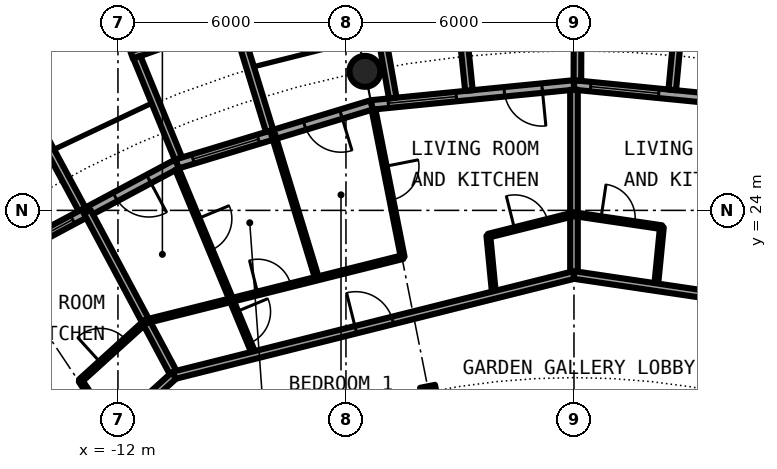
"""IFC4 building model, lengths in metres.
Left out: names, types, materials, properties, quantities, classifications, styles, units other than length and angle.
Written with IfcOpenShell. Run it as: python <this file> out.ifc"""

import sys

from ifc_helpers import new_model, si_unit, direction, frame, frame_2d, origin, origin_2d, place, context, subcontext, project, spatial, rectangle, circle, hollow_circle, i_section, extrude, element, fill, save


model = new_model("IFC4")
c1 = context("Model", 3, precision=1e-05, world=origin(), true_north=direction((0.0, 1.0)))
c2 = subcontext(c1, "Body", "Model", "MODEL_VIEW")
j1 = project(units=[si_unit("LENGTHUNIT", "METRE"), si_unit("PLANEANGLEUNIT", "RADIAN")], contexts=[c1])
p1 = place(None, origin())
s1 = spatial("IfcSite", under=j1, at=p1, CompositionType="ELEMENT")
p2 = place(p1, origin())
s2 = spatial("IfcBuilding", under=s1, at=p2, CompositionType="ELEMENT")
p3 = place(p2, frame((0.0, 0.0, 212.7)))
s3 = spatial("IfcBuildingStorey", under=s2, at=p3, CompositionType="ELEMENT", Elevation=212.7)
p4 = place(p3, frame((-5.501, 27.658, 0.0), z_axis=(0.0, 0.0, 1.0), x_axis=(1.0, 0.0, 0.0)))
e1 = element("IfcColumn", 1, at=p4, inside=s3, PredefinedType="COLUMN", context=c2, shape_type="SweptSolid", body=[
    extrude(hollow_circle(Radius=0.406, WallThickness=0.03, at=origin_2d()), origin(), (0.0, 0.0, 1.0), 3.05),
])
p5 = place(p3, frame((-3.824, 19.223, 0.0), z_axis=(0.0, 0.0, 1.0), x_axis=(-0.195090322016, 0.980785280403, 0.0)))
e2 = element("IfcColumn", 2, at=p5, inside=s3, PredefinedType="COLUMN", context=c2, shape_type="SweptSolid", body=[
    extrude(i_section(OverallWidth=0.3, OverallDepth=0.4, WebThickness=0.013, FlangeThickness=0.024, FilletRadius=0.027, at=origin_2d()), origin(), (0.0, 0.0, 1.0), 3.05),
])
p6 = place(p3, frame((5.326, 26.775, 0.0), z_axis=(0.0, 0.0, 1.0), x_axis=(-0.995173996315, 0.098126026407, 0.0)))
e3 = element("IfcWall", 3, at=p6, inside=s3, PredefinedType="SOLIDWALL", context=c2, shape_type="SweptSolid", body=[
    extrude(rectangle(XDim=5.352, YDim=0.25, at=frame_2d((2.676, 0.0))), origin(), (0.0, 0.0, 1.0), 2.7),
])
p7 = place(p6, frame((0.841, 0.0, 0.0)))
e4 = element("IfcOpeningElement", 4, at=p7, cuts=e3, PredefinedType="OPENING", context=c2, shape_type="SweptSolid", body=[
    extrude(rectangle(XDim=1.0, YDim=2.2, at=frame_2d((0.5, 1.1))), frame((0.0, 0.135, 0.0), z_axis=(0.0, -1.0, 0.0), x_axis=(1.0, 0.0, 0.0)), (0.0, 0.0, 1.0), 0.27),
])
p8 = place(p6, frame((3.111, 0.0, 0.3)))
e5 = element("IfcOpeningElement", 5, at=p8, cuts=e3, PredefinedType="OPENING", context=c2, shape_type="SweptSolid", body=[
    extrude(rectangle(XDim=1.8, YDim=2.1, at=frame_2d((0.9, 1.05))), frame((0.0, 0.135, 0.0), z_axis=(0.0, -1.0, 0.0), x_axis=(1.0, 0.0, 0.0)), (0.0, 0.0, 1.0), 0.27),
])
p9 = place(p3, frame((2.586, 27.171, -0.03), z_axis=(0.0, 0.0, 1.0), x_axis=(0.094548432284, 0.995520262954, 0.0)))
e6 = element("IfcWall", 6, at=p9, inside=s3, PredefinedType="SOLIDWALL", context=c2, shape_type="SweptSolid", body=[
    extrude(rectangle(XDim=3.006, YDim=0.2, at=frame_2d((1.503, 0.0))), origin(), (0.0, 0.0, 1.0), 2.73),
])
p10 = place(p3, frame((0.09, 27.417, -0.03), z_axis=(0.0, 0.0, 1.0), x_axis=(0.00347308367, 0.999993968827, 0.0)))
e7 = element("IfcWall", 7, at=p10, inside=s3, PredefinedType="SOLIDWALL", context=c2, shape_type="SweptSolid", body=[
    extrude(rectangle(XDim=2.882, YDim=0.2, at=frame_2d((1.441, 0.0))), origin(), (0.0, 0.0, 1.0), 2.73),
])
p11 = place(p3, frame((0.0, 27.3, 0.0), z_axis=(0.0, 0.0, 1.0), x_axis=(-0.995173996315, -0.098126026407, 0.0)))
e8 = element("IfcWall", 8, at=p11, inside=s3, PredefinedType="SOLIDWALL", context=c2, shape_type="SweptSolid", body=[
    extrude(rectangle(XDim=5.352, YDim=0.25, at=frame_2d((2.676, 0.0))), origin(), (0.0, 0.0, 1.0), 2.7),
])
p12 = place(p11, frame((0.841, 0.0, 0.0)))
e9 = element("IfcOpeningElement", 9, at=p12, cuts=e8, PredefinedType="OPENING", context=c2, shape_type="SweptSolid", body=[
    extrude(rectangle(XDim=1.0, YDim=2.2, at=frame_2d((0.5, 1.1))), frame((0.0, 0.135, 0.0), z_axis=(0.0, -1.0, 0.0), x_axis=(1.0, 0.0, 0.0)), (0.0, 0.0, 1.0), 0.27),
])
p13 = place(p11, frame((3.111, 0.0, 0.3)))
e10 = element("IfcOpeningElement", 10, at=p13, cuts=e8, PredefinedType="OPENING", context=c2, shape_type="SweptSolid", body=[
    extrude(rectangle(XDim=1.8, YDim=2.1, at=frame_2d((0.9, 1.05))), frame((0.0, 0.135, 0.0), z_axis=(0.0, -1.0, 0.0), x_axis=(1.0, 0.0, 0.0)), (0.0, 0.0, 1.0), 0.27),
])
p14 = place(p3, frame((-2.764, 27.153, -0.03), z_axis=(0.0, 0.0, 1.0), x_axis=(-0.101505487237, 0.994834979311, 0.0)))
e11 = element("IfcWall", 11, at=p14, inside=s3, PredefinedType="SOLIDWALL", context=c2, shape_type="SweptSolid", body=[
    extrude(rectangle(XDim=3.007, YDim=0.2, at=frame_2d((1.503, 0.0))), origin(), (0.0, 0.0, 1.0), 2.73),
])
p15 = place(p3, frame((-4.769, 26.956, -0.03), z_axis=(0.0, 0.0, 1.0), x_axis=(-0.174056778901, 0.984735618183, 0.0)))
e12 = element("IfcWall", 12, at=p15, inside=s3, PredefinedType="SOLIDWALL", context=c2, shape_type="SweptSolid", body=[
    extrude(rectangle(XDim=2.925, YDim=0.2, at=frame_2d((1.462, 0.0))), origin(), (0.0, 0.0, 1.0), 2.73),
])
p16 = place(p3, frame((-5.326, 26.775, 0.0), z_axis=(0.0, 0.0, 1.0), x_axis=(-0.956965678721, -0.290201119486, 0.0)))
e13 = element("IfcWall", 13, at=p16, inside=s3, PredefinedType="SOLIDWALL", context=c2, shape_type="SweptSolid", body=[
    extrude(rectangle(XDim=5.351, YDim=0.25, at=frame_2d((2.676, 0.0))), origin(), (0.0, 0.0, 1.0), 2.7),
])
p17 = place(p16, frame((0.841, 0.0, 0.0)))
e14 = element("IfcOpeningElement", 14, at=p17, cuts=e13, PredefinedType="OPENING", context=c2, shape_type="SweptSolid", body=[
    extrude(rectangle(XDim=1.0, YDim=2.2, at=frame_2d((0.5, 1.1))), frame((0.0, 0.135, 0.0), z_axis=(0.0, -1.0, 0.0), x_axis=(1.0, 0.0, 0.0)), (0.0, 0.0, 1.0), 0.27),
])
p18 = place(p16, frame((3.111, 0.0, 0.3)))
e15 = element("IfcOpeningElement", 15, at=p18, cuts=e13, PredefinedType="OPENING", context=c2, shape_type="SweptSolid", body=[
    extrude(rectangle(XDim=1.8, YDim=2.1, at=frame_2d((0.9, 1.05))), frame((0.0, 0.135, 0.0), z_axis=(0.0, -1.0, 0.0), x_axis=(1.0, 0.0, 0.0)), (0.0, 0.0, 1.0), 0.27),
])
p19 = place(p3, frame((-8.82, 29.093, -0.03), z_axis=(0.0, 0.0, 1.0), x_axis=(-0.941461077774, -0.337121697664, 0.0)))
e16 = element("IfcWall", 16, at=p19, inside=s3, PredefinedType="SOLIDWALL", context=c2, shape_type="SweptSolid", body=[
    extrude(rectangle(XDim=2.993, YDim=0.2, at=frame_2d((1.497, 0.0))), origin(), (0.0, 0.0, 1.0), 2.73),
])
p20 = place(p19, frame((0.457, 0.0, 0.33)))
e17 = element("IfcOpeningElement", 17, at=p20, cuts=e16, PredefinedType="OPENING", context=c2, shape_type="SweptSolid", body=[
    extrude(circle(Radius=1.04, at=frame_2d((1.04, 1.04))), frame((0.0, 0.11, 0.0), z_axis=(0.0, -1.0, 0.0), x_axis=(1.0, 0.0, 0.0)), (0.0, 0.0, 1.0), 0.22),
])
p21 = place(p3, frame((-8.009, 26.092, -0.03), z_axis=(0.0, 0.0, 1.0), x_axis=(-0.293406695073, 0.955987715029, 0.0)))
e18 = element("IfcWall", 18, at=p21, inside=s3, PredefinedType="SOLIDWALL", context=c2, shape_type="SweptSolid", body=[
    extrude(rectangle(XDim=3.006, YDim=0.2, at=frame_2d((1.503, 0.0))), origin(), (0.0, 0.0, 1.0), 2.73),
])
p22 = place(p3, frame((-10.409, 25.364, -0.03), z_axis=(0.0, 0.0, 1.0), x_axis=(-0.379509886562, 0.925187681501, 0.0)))
e19 = element("IfcWall", 19, at=p22, inside=s3, PredefinedType="SOLIDWALL", context=c2, shape_type="SweptSolid", body=[
    extrude(rectangle(XDim=2.883, YDim=0.2, at=frame_2d((1.441, 0.0))), origin(), (0.0, 0.0, 1.0), 2.73),
])
p23 = place(p3, frame((-10.447, 25.222, 0.0), z_axis=(0.0, 0.0, 1.0), x_axis=(-0.881915646801, -0.471407246368, 0.0)))
e20 = element("IfcWall", 20, at=p23, inside=s3, PredefinedType="SOLIDWALL", context=c2, shape_type="SweptSolid", body=[
    extrude(rectangle(XDim=5.352, YDim=0.25, at=frame_2d((2.676, 0.0))), origin(), (0.0, 0.0, 1.0), 2.7),
])
p24 = place(p23, frame((0.841, 0.0, 0.0)))
e21 = element("IfcOpeningElement", 21, at=p24, cuts=e20, PredefinedType="OPENING", context=c2, shape_type="SweptSolid", body=[
    extrude(rectangle(XDim=1.0, YDim=2.2, at=frame_2d((0.5, 1.1))), frame((0.0, 0.135, 0.0), z_axis=(0.0, -1.0, 0.0), x_axis=(1.0, 0.0, 0.0)), (0.0, 0.0, 1.0), 0.27),
])
p25 = place(p23, frame((3.111, 0.0, 0.3)))
e22 = element("IfcOpeningElement", 22, at=p25, cuts=e20, PredefinedType="OPENING", context=c2, shape_type="SweptSolid", body=[
    extrude(rectangle(XDim=1.8, YDim=2.1, at=frame_2d((0.9, 1.05))), frame((0.0, 0.135, 0.0), z_axis=(0.0, -1.0, 0.0), x_axis=(1.0, 0.0, 0.0)), (0.0, 0.0, 1.0), 0.27),
])
p26 = place(p3, frame((-12.945, 24.029, -0.03), z_axis=(0.0, 0.0, 1.0), x_axis=(-0.474424310775, 0.88029629861, 0.0)))
e23 = element("IfcWall", 23, at=p26, inside=s3, PredefinedType="SOLIDWALL", context=c2, shape_type="SweptSolid", body=[
    extrude(rectangle(XDim=3.006, YDim=0.2, at=frame_2d((1.503, 0.0))), origin(), (0.0, 0.0, 1.0), 2.73),
])
p27 = place(p3, frame((-10.446, 25.086, 0.0), z_axis=(0.0, 0.0, 1.0), x_axis=(0.38420646001, -0.923247202046, 0.0)))
e24 = element("IfcWall", 24, at=p27, inside=s3, PredefinedType="PARTITIONING", context=c2, shape_type="SweptSolid", body=[
    extrude(rectangle(XDim=5.3, YDim=0.1, at=frame_2d((2.65, 0.0))), origin(), (0.0, 0.0, 1.0), 2.7),
])
p28 = place(p27, frame((4.065, 0.0, 0.0)))
e25 = element("IfcOpeningElement", 25, at=p28, cuts=e24, PredefinedType="OPENING", context=c2, shape_type="SweptSolid", body=[
    extrude(rectangle(XDim=0.9, YDim=2.3, at=frame_2d((0.45, 1.15))), frame((0.0, 0.06, 0.0), z_axis=(0.0, -1.0, 0.0), x_axis=(1.0, 0.0, 0.0)), (0.0, 0.0, 1.0), 0.12),
])
p29 = place(p27, frame((1.415, 0.0, 0.0)))
e26 = element("IfcOpeningElement", 26, at=p29, cuts=e24, PredefinedType="OPENING", context=c2, shape_type="SweptSolid", body=[
    extrude(rectangle(XDim=0.9, YDim=2.3, at=frame_2d((0.45, 1.15))), frame((0.0, 0.06, 0.0), z_axis=(0.0, -1.0, 0.0), x_axis=(1.0, 0.0, 0.0)), (0.0, 0.0, 1.0), 0.12),
])
p30 = place(p3, frame((-12.988, 19.518, 0.0), z_axis=(0.0, 0.0, 1.0), x_axis=(0.554125989098, -0.832432813028, 0.0)))
e27 = element("IfcWall", 27, at=p30, inside=s3, PredefinedType="PARTITIONING", context=c2, shape_type="SweptSolid", body=[
    extrude(rectangle(XDim=1.57, YDim=0.1, at=frame_2d((0.785, 0.0))), origin(), (0.0, 0.0, 1.0), 2.7),
])
p31 = place(p3, frame((-12.809, 23.966, 0.0), z_axis=(0.0, 0.0, 1.0), x_axis=(0.471271812246, -0.881988026553, 0.0)))
e28 = element("IfcWall", 28, at=p31, inside=s3, PredefinedType="PARTITIONING", context=c2, shape_type="SweptSolid", body=[
    extrude(rectangle(XDim=4.874, YDim=0.2, at=frame_2d((2.437, 0.0))), origin(), (0.0, 0.0, 1.0), 2.7),
])
p32 = place(p3, frame((-7.914, 25.997, 0.0), z_axis=(0.0, 0.0, 1.0), x_axis=(0.291291575636, -0.956634317785, 0.0)))
e29 = element("IfcWall", 29, at=p32, inside=s3, PredefinedType="PARTITIONING", context=c2, shape_type="SweptSolid", body=[
    extrude(rectangle(XDim=3.962, YDim=0.1, at=frame_2d((1.981, 0.0))), origin(), (0.0, 0.0, 1.0), 2.7),
])
p33 = place(p3, frame((-5.276, 26.658, 0.0), z_axis=(0.0, 0.0, 1.0), x_axis=(0.194030211642, -0.980995554001, 0.0)))
e30 = element("IfcWall", 30, at=p33, inside=s3, PredefinedType="PARTITIONING", context=c2, shape_type="SweptSolid", body=[
    extrude(rectangle(XDim=3.962, YDim=0.1, at=frame_2d((1.981, 0.0))), origin(), (0.0, 0.0, 1.0), 2.7),
])
p34 = place(p33, frame((1.531, 0.0, 0.0)))
e31 = element("IfcOpeningElement", 31, at=p34, cuts=e30, PredefinedType="OPENING", context=c2, shape_type="SweptSolid", body=[
    extrude(rectangle(XDim=0.9, YDim=2.3, at=frame_2d((0.45, 1.15))), frame((0.0, 0.06, 0.0), z_axis=(0.0, -1.0, 0.0), x_axis=(1.0, 0.0, 0.0)), (0.0, 0.0, 1.0), 0.12),
])
p35 = place(p3, frame((-2.253, 23.336, 0.0), z_axis=(0.0, 0.0, 1.0), x_axis=(0.09608568494, -0.995373066317, 0.0)))
e32 = element("IfcWall", 32, at=p35, inside=s3, PredefinedType="PARTITIONING", context=c2, shape_type="SweptSolid", body=[
    extrude(rectangle(XDim=1.57, YDim=0.1, at=frame_2d((0.785, 0.0))), origin(), (0.0, 0.0, 1.0), 2.7),
])
p36 = place(p3, frame((0.0, 22.3, 0.0), z_axis=(0.0, 0.0, 1.0), x_axis=(0.0, 1.0, 0.0)))
e33 = element("IfcWall", 33, at=p36, inside=s3, PredefinedType="PARTITIONING", context=c2, shape_type="SweptSolid", body=[
    extrude(rectangle(XDim=4.875, YDim=0.2, at=frame_2d((2.438, 0.0))), origin(), (0.0, 0.0, 1.0), 2.7),
])
p37 = place(p3, frame((2.158, 21.98, 0.0), z_axis=(0.0, 0.0, 1.0), x_axis=(0.097840737576, 0.995202085041, 0.0)))
e34 = element("IfcWall", 34, at=p37, inside=s3, PredefinedType="PARTITIONING", context=c2, shape_type="SweptSolid", body=[
    extrude(rectangle(XDim=1.584, YDim=0.1, at=frame_2d((0.792, 0.0))), origin(), (0.0, 0.0, 1.0), 2.7),
])
p38 = place(p3, frame((-18.543, 12.386, 0.0), z_axis=(0.0, 0.0, 1.0), x_axis=(0.740853508928, 0.671666642248, 0.0)))
e35 = element("IfcWall", 35, at=p38, inside=s3, PredefinedType="PARTITIONING", context=c2, shape_type="SweptSolid", body=[
    extrude(rectangle(XDim=10.84, YDim=0.2, at=frame_2d((5.42, 0.0))), origin(), (0.0, 0.0, 1.0), 2.7),
])
p39 = place(p38, frame((4.921, 0.0, 0.0)))
e36 = element("IfcOpeningElement", 36, at=p39, cuts=e35, PredefinedType="OPENING", context=c2, shape_type="SweptSolid", body=[
    extrude(rectangle(XDim=1.0, YDim=2.3, at=frame_2d((0.5, 1.15))), frame((0.0, 0.11, 0.0), z_axis=(0.0, -1.0, 0.0), x_axis=(1.0, 0.0, 0.0)), (0.0, 0.0, 1.0), 0.22),
])
p40 = place(p3, frame((-10.521, 19.662, 0.0), z_axis=(0.0, 0.0, 1.0), x_axis=(0.969975443945, 0.243202874456, 0.0)))
e37 = element("IfcWall", 37, at=p40, inside=s3, PredefinedType="PARTITIONING", context=c2, shape_type="SweptSolid", body=[
    extrude(rectangle(XDim=10.847, YDim=0.2, at=frame_2d((5.423, 0.0))), origin(), (0.0, 0.0, 1.0), 2.7),
])
p41 = place(p40, frame((4.928, 0.0, 0.0)))
e38 = element("IfcOpeningElement", 38, at=p41, cuts=e37, PredefinedType="OPENING", context=c2, shape_type="SweptSolid", body=[
    extrude(rectangle(XDim=1.0, YDim=2.3, at=frame_2d((0.5, 1.15))), frame((0.0, 0.11, 0.0), z_axis=(0.0, -1.0, 0.0), x_axis=(1.0, 0.0, 0.0)), (0.0, 0.0, 1.0), 0.22),
])
p42 = place(p3, frame((0.0, 22.3, 0.0), z_axis=(0.0, 0.0, 1.0), x_axis=(0.989181015112, -0.146700100005, 0.0)))
e39 = element("IfcWall", 39, at=p42, inside=s3, PredefinedType="PARTITIONING", context=c2, shape_type="SweptSolid", body=[
    extrude(rectangle(XDim=6.544, YDim=0.2, at=frame_2d((3.272, 0.0))), origin(), (0.0, 0.0, 1.0), 2.7),
])
p43 = place(p42, frame((3.863, 0.0, 0.0)))
e40 = element("IfcOpeningElement", 40, at=p43, cuts=e39, PredefinedType="OPENING", context=c2, shape_type="SweptSolid", body=[
    extrude(rectangle(XDim=1.0, YDim=2.3, at=frame_2d((0.5, 1.15))), frame((0.0, 0.11, 0.0), z_axis=(0.0, -1.0, 0.0), x_axis=(1.0, 0.0, 0.0)), (0.0, 0.0, 1.0), 0.22),
])
p44 = place(p3, frame((-12.993, 19.513, 0.0), z_axis=(0.0, 0.0, 1.0), x_axis=(0.74087097024, 0.671647381783, 0.0)))
e41 = element("IfcWall", 41, at=p44, inside=s3, PredefinedType="PARTITIONING", context=c2, shape_type="SweptSolid", body=[
    extrude(rectangle(XDim=2.324, YDim=0.1, at=frame_2d((1.162, 0.0))), origin(), (0.0, 0.0, 1.0), 2.7),
])
p45 = place(p44, frame((0.719, 0.0, 0.0)))
e42 = element("IfcOpeningElement", 42, at=p45, cuts=e41, PredefinedType="OPENING", context=c2, shape_type="SweptSolid", body=[
    extrude(rectangle(XDim=0.9, YDim=2.3, at=frame_2d((0.45, 1.15))), frame((0.0, 0.06, 0.0), z_axis=(0.0, -1.0, 0.0), x_axis=(1.0, 0.0, 0.0)), (0.0, 0.0, 1.0), 0.12),
])
p46 = place(p3, frame((-11.266, 21.078, 0.0), z_axis=(0.0, 0.0, 1.0), x_axis=(0.970072433546, 0.242815719578, 0.0)))
e43 = element("IfcWall", 43, at=p46, inside=s3, PredefinedType="PARTITIONING", context=c2, shape_type="SweptSolid", body=[
    extrude(rectangle(XDim=6.973, YDim=0.1, at=frame_2d((3.486, 0.0))), origin(), (0.0, 0.0, 1.0), 2.7),
])
p47 = place(p46, frame((3.036, 0.0, 0.0)))
e44 = element("IfcOpeningElement", 44, at=p47, cuts=e43, PredefinedType="OPENING", context=c2, shape_type="SweptSolid", body=[
    extrude(rectangle(XDim=0.9, YDim=2.3, at=frame_2d((0.45, 1.15))), frame((0.0, 0.06, 0.0), z_axis=(0.0, -1.0, 0.0), x_axis=(1.0, 0.0, 0.0)), (0.0, 0.0, 1.0), 0.12),
])
p48 = place(p3, frame((-2.253, 23.334, 0.0), z_axis=(0.0, 0.0, 1.0), x_axis=(0.970068250789, 0.242832429489, 0.0)))
e45 = element("IfcWall", 45, at=p48, inside=s3, PredefinedType="PARTITIONING", context=c2, shape_type="SweptSolid", body=[
    extrude(rectangle(XDim=2.323, YDim=0.1, at=frame_2d((1.161, 0.0))), origin(), (0.0, 0.0, 1.0), 2.7),
])
p49 = place(p48, frame((0.712, 0.0, 0.0)))
e46 = element("IfcOpeningElement", 46, at=p49, cuts=e45, PredefinedType="OPENING", context=c2, shape_type="SweptSolid", body=[
    extrude(rectangle(XDim=0.9, YDim=2.3, at=frame_2d((0.45, 1.15))), frame((0.0, 0.06, 0.0), z_axis=(0.0, -1.0, 0.0), x_axis=(1.0, 0.0, 0.0)), (0.0, 0.0, 1.0), 0.12),
])
p50 = place(p3, frame((0.0, 23.9, 0.0), z_axis=(0.0, 0.0, 1.0), x_axis=(0.989181588285, -0.146696235121, 0.0)))
e47 = element("IfcWall", 47, at=p50, inside=s3, PredefinedType="PARTITIONING", context=c2, shape_type="SweptSolid", body=[
    extrude(rectangle(XDim=2.338, YDim=0.1, at=frame_2d((1.169, 0.0))), origin(), (0.0, 0.0, 1.0), 2.7),
])
p51 = place(p50, frame((0.719, 0.0, 0.0)))
e48 = element("IfcOpeningElement", 48, at=p51, cuts=e47, PredefinedType="OPENING", context=c2, shape_type="SweptSolid", body=[
    extrude(rectangle(XDim=0.9, YDim=2.3, at=frame_2d((0.45, 1.15))), frame((0.0, 0.06, 0.0), z_axis=(0.0, -1.0, 0.0), x_axis=(1.0, 0.0, 0.0)), (0.0, 0.0, 1.0), 0.12),
])
p52 = place(p8, origin())
e49 = element("IfcWindow", 49, at=p52, inside=s3, PartitioningType="SINGLE_PANEL", PredefinedType="WINDOW", context=c2, shape_type="SweptSolid", body=[
    extrude(rectangle(XDim=1.8, YDim=2.1, at=frame_2d((0.9, 1.05))), frame((0.0, 0.03, 0.0), z_axis=(0.0, -1.0, 0.0), x_axis=(1.0, 0.0, 0.0)), (0.0, 0.0, 1.0), 0.06),
])
fill(e5, e49)
p53 = place(p12, origin())
e50 = element("IfcDoor", 50, at=p53, inside=s3, OperationType="SINGLE_SWING_LEFT", PredefinedType="DOOR", context=c2, shape_type="SweptSolid", body=[
    extrude(rectangle(XDim=1.0, YDim=2.2, at=frame_2d((0.5, 1.1))), frame((0.0, 0.025, 0.0), z_axis=(0.0, -1.0, 0.0), x_axis=(1.0, 0.0, 0.0)), (0.0, 0.0, 1.0), 0.05),
])
fill(e9, e50)
p54 = place(p13, origin())
e51 = element("IfcWindow", 51, at=p54, inside=s3, PartitioningType="SINGLE_PANEL", PredefinedType="WINDOW", context=c2, shape_type="SweptSolid", body=[
    extrude(rectangle(XDim=1.8, YDim=2.1, at=frame_2d((0.9, 1.05))), frame((0.0, 0.03, 0.0), z_axis=(0.0, -1.0, 0.0), x_axis=(1.0, 0.0, 0.0)), (0.0, 0.0, 1.0), 0.06),
])
fill(e10, e51)
p55 = place(p17, origin())
e52 = element("IfcDoor", 52, at=p55, inside=s3, OperationType="SINGLE_SWING_LEFT", PredefinedType="DOOR", context=c2, shape_type="SweptSolid", body=[
    extrude(rectangle(XDim=1.0, YDim=2.2, at=frame_2d((0.5, 1.1))), frame((0.0, 0.025, 0.0), z_axis=(0.0, -1.0, 0.0), x_axis=(1.0, 0.0, 0.0)), (0.0, 0.0, 1.0), 0.05),
])
fill(e14, e52)
p56 = place(p18, origin())
e53 = element("IfcWindow", 53, at=p56, inside=s3, PartitioningType="SINGLE_PANEL", PredefinedType="WINDOW", context=c2, shape_type="SweptSolid", body=[
    extrude(rectangle(XDim=1.8, YDim=2.1, at=frame_2d((0.9, 1.05))), frame((0.0, 0.03, 0.0), z_axis=(0.0, -1.0, 0.0), x_axis=(1.0, 0.0, 0.0)), (0.0, 0.0, 1.0), 0.06),
])
fill(e15, e53)
p57 = place(p24, origin())
e54 = element("IfcDoor", 54, at=p57, inside=s3, OperationType="SINGLE_SWING_LEFT", PredefinedType="DOOR", context=c2, shape_type="SweptSolid", body=[
    extrude(rectangle(XDim=1.0, YDim=2.2, at=frame_2d((0.5, 1.1))), frame((0.0, 0.025, 0.0), z_axis=(0.0, -1.0, 0.0), x_axis=(1.0, 0.0, 0.0)), (0.0, 0.0, 1.0), 0.05),
])
fill(e21, e54)
p58 = place(p25, origin())
e55 = element("IfcWindow", 55, at=p58, inside=s3, PartitioningType="SINGLE_PANEL", PredefinedType="WINDOW", context=c2, shape_type="SweptSolid", body=[
    extrude(rectangle(XDim=1.8, YDim=2.1, at=frame_2d((0.9, 1.05))), frame((0.0, 0.03, 0.0), z_axis=(0.0, -1.0, 0.0), x_axis=(1.0, 0.0, 0.0)), (0.0, 0.0, 1.0), 0.06),
])
fill(e22, e55)
p59 = place(p51, origin())
e56 = element("IfcDoor", 56, at=p59, inside=s3, OperationType="SINGLE_SWING_RIGHT", PredefinedType="DOOR", context=c2, shape_type="SweptSolid", body=[
    extrude(rectangle(XDim=0.9, YDim=2.3, at=frame_2d((0.45, 1.15))), frame((0.0, 0.025, 0.0), z_axis=(0.0, -1.0, 0.0), x_axis=(1.0, 0.0, 0.0)), (0.0, 0.0, 1.0), 0.05),
])
fill(e48, e56)
p60 = place(p41, origin())
e57 = element("IfcDoor", 57, at=p60, inside=s3, OperationType="SINGLE_SWING_RIGHT", PredefinedType="DOOR", context=c2, shape_type="SweptSolid", body=[
    extrude(rectangle(XDim=1.0, YDim=2.3, at=frame_2d((0.5, 1.15))), frame((0.0, 0.025, 0.0), z_axis=(0.0, -1.0, 0.0), x_axis=(1.0, 0.0, 0.0)), (0.0, 0.0, 1.0), 0.05),
])
fill(e38, e57)
p61 = place(p49, origin())
e58 = element("IfcDoor", 58, at=p61, inside=s3, OperationType="SINGLE_SWING_RIGHT", PredefinedType="DOOR", context=c2, shape_type="SweptSolid", body=[
    extrude(rectangle(XDim=0.9, YDim=2.3, at=frame_2d((0.45, 1.15))), frame((0.0, 0.025, 0.0), z_axis=(0.0, -1.0, 0.0), x_axis=(1.0, 0.0, 0.0)), (0.0, 0.0, 1.0), 0.05),
])
fill(e46, e58)
p62 = place(p28, origin())
e59 = element("IfcDoor", 59, at=p62, inside=s3, OperationType="SINGLE_SWING_RIGHT", PredefinedType="DOOR", context=c2, shape_type="SweptSolid", body=[
    extrude(rectangle(XDim=0.9, YDim=2.3, at=frame_2d((0.45, 1.15))), frame((0.0, 0.025, 0.0), z_axis=(0.0, -1.0, 0.0), x_axis=(1.0, 0.0, 0.0)), (0.0, 0.0, 1.0), 0.05),
])
fill(e25, e59)
p63 = place(p34, origin())
e60 = element("IfcDoor", 60, at=p63, inside=s3, OperationType="SINGLE_SWING_LEFT", PredefinedType="DOOR", context=c2, shape_type="SweptSolid", body=[
    extrude(rectangle(XDim=0.9, YDim=2.3, at=frame_2d((0.45, 1.15))), frame((0.0, 0.025, 0.0), z_axis=(0.0, -1.0, 0.0), x_axis=(1.0, 0.0, 0.0)), (0.0, 0.0, 1.0), 0.05),
])
fill(e31, e60)
p64 = place(p47, origin())
e61 = element("IfcDoor", 61, at=p64, inside=s3, OperationType="SINGLE_SWING_LEFT", PredefinedType="DOOR", context=c2, shape_type="SweptSolid", body=[
    extrude(rectangle(XDim=0.9, YDim=2.3, at=frame_2d((0.45, 1.15))), frame((0.0, 0.025, 0.0), z_axis=(0.0, -1.0, 0.0), x_axis=(1.0, 0.0, 0.0)), (0.0, 0.0, 1.0), 0.05),
])
fill(e44, e61)
p65 = place(p29, origin())
e62 = element("IfcDoor", 62, at=p65, inside=s3, OperationType="SINGLE_SWING_LEFT", PredefinedType="DOOR", context=c2, shape_type="SweptSolid", body=[
    extrude(rectangle(XDim=0.9, YDim=2.3, at=frame_2d((0.45, 1.15))), frame((0.0, 0.025, 0.0), z_axis=(0.0, -1.0, 0.0), x_axis=(1.0, 0.0, 0.0)), (0.0, 0.0, 1.0), 0.05),
])
fill(e26, e62)
p66 = place(p45, origin())
e63 = element("IfcDoor", 63, at=p66, inside=s3, OperationType="SINGLE_SWING_RIGHT", PredefinedType="DOOR", context=c2, shape_type="SweptSolid", body=[
    extrude(rectangle(XDim=0.9, YDim=2.3, at=frame_2d((0.45, 1.15))), frame((0.0, 0.025, 0.0), z_axis=(0.0, -1.0, 0.0), x_axis=(1.0, 0.0, 0.0)), (0.0, 0.0, 1.0), 0.05),
])
fill(e42, e63)
save(model, sys.argv[1])
